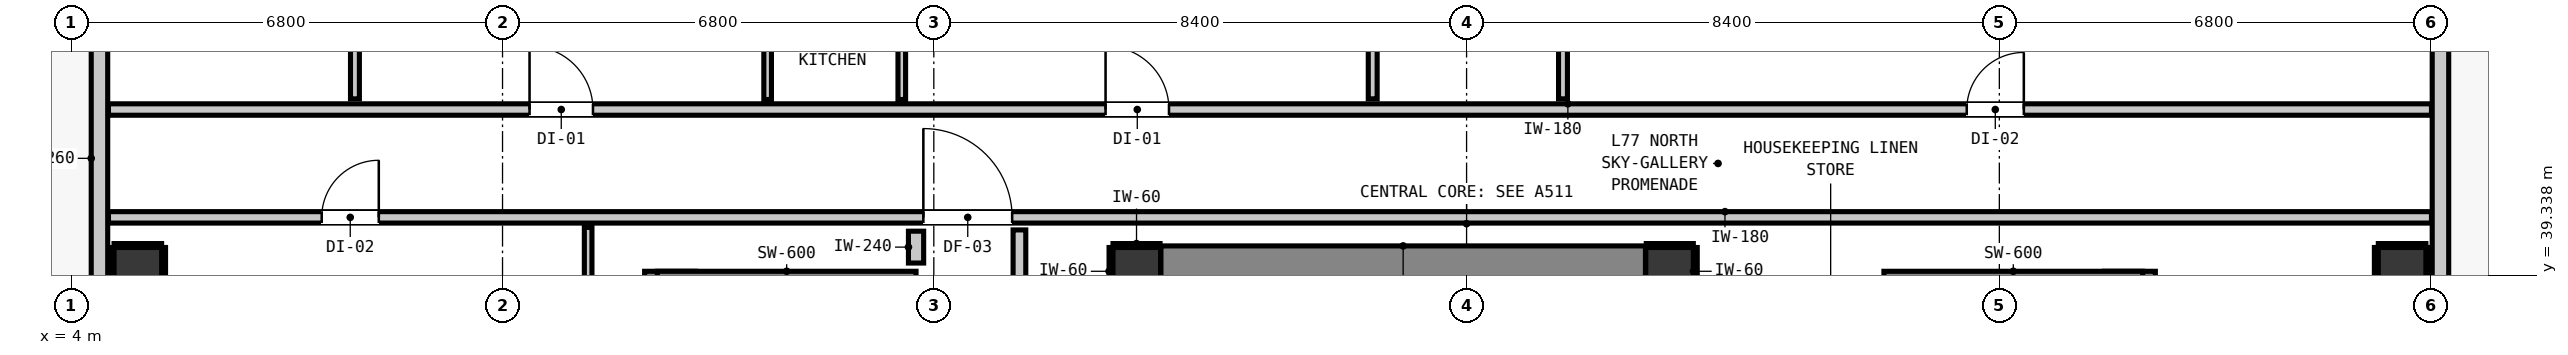
"""IFC4 building model, lengths in metres.
Left out: names, types, materials, properties, quantities, classifications, styles, units other than length and angle.
Written with IfcOpenShell. Run it as: python <this file> out.ifc"""

import sys

from ifc_helpers import new_model, si_unit, direction, frame, frame_2d, origin, origin_2d, place, context, subcontext, project, spatial, rectangle, extrude, element, fill, save


model = new_model("IFC4")
c1 = context("Model", 3, precision=1e-05, world=origin(), true_north=direction((0.0, 1.0)))
c2 = subcontext(c1, "Body", "Model", "MODEL_VIEW")
j1 = project(units=[si_unit("LENGTHUNIT", "METRE"), si_unit("PLANEANGLEUNIT", "RADIAN")], contexts=[c1])
p1 = place(None, origin())
s1 = spatial("IfcSite", under=j1, at=p1, CompositionType="ELEMENT")
p2 = place(p1, origin())
s2 = spatial("IfcBuilding", under=s1, at=p2, CompositionType="ELEMENT")
p3 = place(p2, frame((0.0, 0.0, 265.56)))
s3 = spatial("IfcBuildingStorey", under=s2, at=p3, CompositionType="ELEMENT", Elevation=265.56)
for number, where, z_axis, x_axis in (
    (1, (20.8, 39.4, 0.0), (0.0, 0.0, 1.0), (1.0, 0.0, 0.0)),
    (2, (29.2, 39.4, 0.0), (0.0, 0.0, 1.0), (1.0, 0.0, 0.0)),
):
    element("IfcColumn", number, at=place(p3, frame(where, z_axis=z_axis, x_axis=x_axis)), inside=s3, PredefinedType="COLUMN", context=c2, shape_type="SweptSolid", body=[
        extrude(rectangle(XDim=0.75, YDim=0.75, at=origin_2d()), origin(), (0.0, 0.0, 1.0), 3.32),
    ])
p4 = place(p3, frame((13.44, 31.08, 0.0), z_axis=(0.0, 0.0, 1.0), x_axis=(0.0, 1.0, 0.0)))
e3 = element("IfcWall", 3, at=p4, inside=s3, PredefinedType="SHEAR", context=c2, shape_type="SweptSolid", body=[
    extrude(rectangle(XDim=8.32, YDim=0.8, at=frame_2d((4.16, 0.0))), origin(), (0.0, 0.0, 1.0), 3.32),
])
p5 = place(p3, frame((13.24, 39.1, 0.0), z_axis=(0.0, 0.0, 1.0), x_axis=(1.0, 0.0, 0.0)))
e4 = element("IfcWall", 4, at=p5, inside=s3, PredefinedType="SHEAR", context=c2, shape_type="SweptSolid", body=[
    extrude(rectangle(XDim=4.08, YDim=0.6, at=frame_2d((2.04, 0.0))), origin(), (0.0, 0.0, 1.0), 3.32),
])
p6 = place(p3, frame((36.46, 31.08, 0.0), z_axis=(0.0, 0.0, 1.0), x_axis=(0.0, 1.0, 0.0)))
e5 = element("IfcWall", 5, at=p6, inside=s3, PredefinedType="SHEAR", context=c2, shape_type="SweptSolid", body=[
    extrude(rectangle(XDim=8.32, YDim=0.8, at=frame_2d((4.16, 0.0))), origin(), (0.0, 0.0, 1.0), 3.32),
])
p7 = place(p3, frame((32.58, 39.1, 0.0), z_axis=(0.0, 0.0, 1.0), x_axis=(1.0, 0.0, 0.0)))
e6 = element("IfcWall", 6, at=p7, inside=s3, PredefinedType="SHEAR", context=c2, shape_type="SweptSolid", body=[
    extrude(rectangle(XDim=4.08, YDim=0.6, at=frame_2d((2.04, 0.0))), origin(), (0.0, 0.0, 1.0), 3.32),
])
p8 = place(p3, frame((21.18, 39.4, 0.0), z_axis=(0.0, 0.0, 1.0), x_axis=(1.0, 0.0, 0.0)))
e7 = element("IfcWall", 7, at=p8, inside=s3, PredefinedType="SHEAR", context=c2, shape_type="SweptSolid", body=[
    extrude(rectangle(XDim=7.64, YDim=0.8, at=frame_2d((3.82, 0.0))), origin(), (0.0, 0.0, 1.0), 3.32),
])
for number, where, z_axis, x_axis in (
    (8, (5.05, 39.4, 0.0), (0.0, 0.0, 1.0), (1.0, 0.0, 0.0)),
    (9, (40.75, 39.4, 0.0), (0.0, 0.0, 1.0), (1.0, 0.0, 0.0)),
):
    element("IfcColumn", number, at=place(p3, frame(where, z_axis=z_axis, x_axis=x_axis)), inside=s3, PredefinedType="COLUMN", context=c2, shape_type="SweptSolid", body=[
        extrude(rectangle(XDim=0.75, YDim=0.75, at=origin_2d()), origin(), (0.0, 0.0, 1.0), 3.32),
    ])
p9 = place(p3, frame((4.445, 18.545, 0.0), z_axis=(0.0, 0.0, 1.0), x_axis=(0.0, 1.0, 0.0)))
e10 = element("IfcWall", 10, at=p9, inside=s3, PredefinedType="STANDARD", context=c2, shape_type="SweptSolid", body=[
    extrude(rectangle(XDim=30.31, YDim=0.26, at=frame_2d((15.155, 0.0))), origin(), (0.0, 0.0, 1.0), 3.1),
])
p10 = place(p9, frame((4.434, 0.0, 0.0)))
e11 = element("IfcOpeningElement", 11, at=p10, cuts=e10, PredefinedType="OPENING", context=c2, shape_type="SweptSolid", body=[
    extrude(rectangle(XDim=1.0, YDim=2.15, at=frame_2d((0.5, 1.075))), frame((0.0, 0.14, 0.0), z_axis=(0.0, -1.0, 0.0), x_axis=(1.0, 0.0, 0.0)), (0.0, 0.0, 1.0), 0.28),
])
p11 = place(p9, frame((28.241, 0.0, 0.85)))
e12 = element("IfcOpeningElement", 12, at=p11, cuts=e10, PredefinedType="OPENING", context=c2, shape_type="SweptSolid", body=[
    extrude(rectangle(XDim=1.05, YDim=1.65, at=frame_2d((0.525, 0.825))), frame((0.0, 0.14, 0.0), z_axis=(0.0, -1.0, 0.0), x_axis=(1.0, 0.0, 0.0)), (0.0, 0.0, 1.0), 0.28),
])
p12 = place(p9, frame((15.98, 0.0, 0.85)))
e13 = element("IfcOpeningElement", 13, at=p12, cuts=e10, PredefinedType="OPENING", context=c2, shape_type="SweptSolid", body=[
    extrude(rectangle(XDim=1.05, YDim=1.65, at=frame_2d((0.525, 0.825))), frame((0.0, 0.14, 0.0), z_axis=(0.0, -1.0, 0.0), x_axis=(1.0, 0.0, 0.0)), (0.0, 0.0, 1.0), 0.28),
])
p13 = place(p3, frame((41.355, 48.855, 0.0), z_axis=(0.0, 0.0, 1.0), x_axis=(0.0, -1.0, 0.0)))
e14 = element("IfcWall", 14, at=p13, inside=s3, PredefinedType="STANDARD", context=c2, shape_type="SweptSolid", body=[
    extrude(rectangle(XDim=30.31, YDim=0.26, at=frame_2d((15.155, 0.0))), origin(), (0.0, 0.0, 1.0), 3.1),
])
p14 = place(p13, frame((0.91, 0.0, 0.0)))
e15 = element("IfcOpeningElement", 15, at=p14, cuts=e14, PredefinedType="OPENING", context=c2, shape_type="SweptSolid", body=[
    extrude(rectangle(XDim=1.0, YDim=2.15, at=frame_2d((0.5, 1.075))), frame((0.0, 0.14, 0.0), z_axis=(0.0, -1.0, 0.0), x_axis=(1.0, 0.0, 0.0)), (0.0, 0.0, 1.0), 0.28),
])
p15 = place(p13, frame((3.932, 0.0, 0.85)))
e16 = element("IfcOpeningElement", 16, at=p15, cuts=e14, PredefinedType="OPENING", context=c2, shape_type="SweptSolid", body=[
    extrude(rectangle(XDim=1.05, YDim=1.65, at=frame_2d((0.525, 0.825))), frame((0.0, 0.14, 0.0), z_axis=(0.0, -1.0, 0.0), x_axis=(1.0, 0.0, 0.0)), (0.0, 0.0, 1.0), 0.28),
])
p16 = place(p3, frame((4.587, 40.25, 0.0), z_axis=(0.0, 0.0, 1.0), x_axis=(1.0, 0.0, 0.0)))
e17 = element("IfcWall", 17, at=p16, inside=s3, PredefinedType="PARTITIONING", context=c2, shape_type="SweptSolid", body=[
    extrude(rectangle(XDim=36.626, YDim=0.18, at=frame_2d((18.313, 0.0))), origin(), (0.0, 0.0, 1.0), 3.1),
])
p17 = place(p16, frame((12.848, 0.0, 0.0)))
e18 = element("IfcOpeningElement", 18, at=p17, cuts=e17, PredefinedType="OPENING", context=c2, shape_type="SweptSolid", body=[
    extrude(rectangle(XDim=1.4, YDim=2.15, at=frame_2d((0.7, 1.075))), frame((0.0, 0.1, 0.0), z_axis=(0.0, -1.0, 0.0), x_axis=(1.0, 0.0, 0.0)), (0.0, 0.0, 1.0), 0.2),
])
p18 = place(p16, frame((3.362, 0.0, 0.0)))
e19 = element("IfcOpeningElement", 19, at=p18, cuts=e17, PredefinedType="OPENING", context=c2, shape_type="SweptSolid", body=[
    extrude(rectangle(XDim=0.9, YDim=2.1, at=frame_2d((0.45, 1.05))), frame((0.0, 0.1, 0.0), z_axis=(0.0, -1.0, 0.0), x_axis=(1.0, 0.0, 0.0)), (0.0, 0.0, 1.0), 0.2),
])
p19 = place(p3, frame((4.587, 41.95, 0.0), z_axis=(0.0, 0.0, 1.0), x_axis=(1.0, 0.0, 0.0)))
e20 = element("IfcWall", 20, at=p19, inside=s3, PredefinedType="PARTITIONING", context=c2, shape_type="SweptSolid", body=[
    extrude(rectangle(XDim=36.626, YDim=0.18, at=frame_2d((18.313, 0.0))), origin(), (0.0, 0.0, 1.0), 3.1),
])
p20 = place(p19, frame((6.639, 0.0, 0.0)))
e21 = element("IfcOpeningElement", 21, at=p20, cuts=e20, PredefinedType="OPENING", context=c2, shape_type="SweptSolid", body=[
    extrude(rectangle(XDim=1.0, YDim=2.15, at=frame_2d((0.5, 1.075))), frame((0.0, 0.1, 0.0), z_axis=(0.0, -1.0, 0.0), x_axis=(1.0, 0.0, 0.0)), (0.0, 0.0, 1.0), 0.2),
])
p21 = place(p19, frame((15.721, 0.0, 0.0)))
e22 = element("IfcOpeningElement", 22, at=p21, cuts=e20, PredefinedType="OPENING", context=c2, shape_type="SweptSolid", body=[
    extrude(rectangle(XDim=1.0, YDim=2.15, at=frame_2d((0.5, 1.075))), frame((0.0, 0.1, 0.0), z_axis=(0.0, -1.0, 0.0), x_axis=(1.0, 0.0, 0.0)), (0.0, 0.0, 1.0), 0.2),
])
p22 = place(p19, frame((29.299, 0.0, 0.0)))
e23 = element("IfcOpeningElement", 23, at=p22, cuts=e20, PredefinedType="OPENING", context=c2, shape_type="SweptSolid", body=[
    extrude(rectangle(XDim=0.9, YDim=2.1, at=frame_2d((0.45, 1.05))), frame((0.0, 0.1, 0.0), z_axis=(0.0, -1.0, 0.0), x_axis=(1.0, 0.0, 0.0)), (0.0, 0.0, 1.0), 0.2),
])
p23 = place(p3, frame((17.32, 39.53, 0.0), z_axis=(0.0, 0.0, 1.0), x_axis=(0.0, 1.0, 0.0)))
e24 = element("IfcWall", 24, at=p23, inside=s3, PredefinedType="PARTITIONING", context=c2, shape_type="SweptSolid", body=[
    extrude(rectangle(XDim=0.502, YDim=0.24, at=frame_2d((0.251, 0.0))), origin(), (0.0, 0.0, 1.0), 3.1),
])
p24 = place(p3, frame((18.95, 38.918, 0.0), z_axis=(0.0, 0.0, 1.0), x_axis=(0.0, 1.0, 0.0)))
e25 = element("IfcWall", 25, at=p24, inside=s3, PredefinedType="PARTITIONING", context=c2, shape_type="SweptSolid", body=[
    extrude(rectangle(XDim=1.134, YDim=0.2, at=frame_2d((0.567, 0.0))), origin(), (0.0, 0.0, 1.0), 3.1),
])
p25 = place(p3, frame((8.473, 42.118, 0.0), z_axis=(0.0, 0.0, 1.0), x_axis=(0.0, 1.0, 0.0)))
e26 = element("IfcWall", 26, at=p25, inside=s3, PredefinedType="PARTITIONING", context=c2, shape_type="SweptSolid", body=[
    extrude(rectangle(XDim=3.49, YDim=0.14, at=frame_2d((1.745, 0.0))), origin(), (0.0, 0.0, 1.0), 3.1),
])
p26 = place(p25, frame((1.318, 0.0, 0.0)))
e27 = element("IfcOpeningElement", 27, at=p26, cuts=e26, PredefinedType="OPENING", context=c2, shape_type="SweptSolid", body=[
    extrude(rectangle(XDim=0.86, YDim=2.02, at=frame_2d((0.43, 1.01))), frame((0.0, 0.08, 0.0), z_axis=(0.0, -1.0, 0.0), x_axis=(1.0, 0.0, 0.0)), (0.0, 0.0, 1.0), 0.16),
])
p27 = place(p3, frame((24.52, 42.118, 0.0), z_axis=(0.0, 0.0, 1.0), x_axis=(0.0, 1.0, 0.0)))
e28 = element("IfcWall", 28, at=p27, inside=s3, PredefinedType="PARTITIONING", context=c2, shape_type="SweptSolid", body=[
    extrude(rectangle(XDim=3.49, YDim=0.14, at=frame_2d((1.745, 0.0))), origin(), (0.0, 0.0, 1.0), 3.1),
])
p28 = place(p27, frame((1.298, 0.0, 0.0)))
e29 = element("IfcOpeningElement", 29, at=p28, cuts=e28, PredefinedType="OPENING", context=c2, shape_type="SweptSolid", body=[
    extrude(rectangle(XDim=0.9, YDim=2.1, at=frame_2d((0.45, 1.05))), frame((0.0, 0.08, 0.0), z_axis=(0.0, -1.0, 0.0), x_axis=(1.0, 0.0, 0.0)), (0.0, 0.0, 1.0), 0.16),
])
p29 = place(p3, frame((27.52, 42.118, 0.0), z_axis=(0.0, 0.0, 1.0), x_axis=(0.0, 1.0, 0.0)))
e30 = element("IfcWall", 30, at=p29, inside=s3, PredefinedType="PARTITIONING", context=c2, shape_type="SweptSolid", body=[
    extrude(rectangle(XDim=3.49, YDim=0.14, at=frame_2d((1.745, 0.0))), origin(), (0.0, 0.0, 1.0), 3.1),
])
p30 = place(p3, frame((12.15, 29.938, 0.0), z_axis=(0.0, 0.0, 1.0), x_axis=(0.0, 1.0, 0.0)))
e31 = element("IfcWall", 31, at=p30, inside=s3, PredefinedType="PARTITIONING", context=c2, shape_type="SweptSolid", body=[
    extrude(rectangle(XDim=10.154, YDim=0.12, at=frame_2d((5.077, 0.0))), origin(), (0.0, 0.0, 1.0), 3.1),
])
p31 = place(p3, frame((14.98, 42.108, 0.0), z_axis=(0.0, 0.0, 1.0), x_axis=(0.0, 1.0, 0.0)))
e32 = element("IfcWall", 32, at=p31, inside=s3, PredefinedType="PARTITIONING", context=c2, shape_type="SweptSolid", body=[
    extrude(rectangle(XDim=8.705, YDim=0.12, at=frame_2d((4.353, 0.0))), origin(), (0.0, 0.0, 1.0), 3.1),
])
p32 = place(p31, frame((3.817, 0.0, 0.0)))
e33 = element("IfcOpeningElement", 33, at=p32, cuts=e32, PredefinedType="OPENING", context=c2, shape_type="SweptSolid", body=[
    extrude(rectangle(XDim=0.9, YDim=2.1, at=frame_2d((0.45, 1.05))), frame((0.0, 0.07, 0.0), z_axis=(0.0, -1.0, 0.0), x_axis=(1.0, 0.0, 0.0)), (0.0, 0.0, 1.0), 0.14),
])
p33 = place(p3, frame((17.095, 42.108, 0.0), z_axis=(0.0, 0.0, 1.0), x_axis=(0.0, 1.0, 0.0)))
e34 = element("IfcWall", 34, at=p33, inside=s3, PredefinedType="PARTITIONING", context=c2, shape_type="SweptSolid", body=[
    extrude(rectangle(XDim=8.705, YDim=0.12, at=frame_2d((4.353, 0.0))), origin(), (0.0, 0.0, 1.0), 3.1),
])
p34 = place(p3, frame((20.425, 39.807, 0.0), z_axis=(0.0, 0.0, 1.0), x_axis=(1.0, 0.0, 0.0)))
e35 = element("IfcWall", 35, at=p34, inside=s3, PredefinedType="PARTITIONING", context=c2, shape_type="SweptSolid", body=[
    extrude(rectangle(XDim=0.742, YDim=0.06, at=frame_2d((0.371, 0.0))), origin(), (0.0, 0.0, 1.0), 1.45),
])
p35 = place(p3, frame((20.393, 39.025, 0.0), z_axis=(0.0, 0.0, 1.0), x_axis=(0.0, 1.0, 0.0)))
e36 = element("IfcWall", 36, at=p35, inside=s3, PredefinedType="PARTITIONING", context=c2, shape_type="SweptSolid", body=[
    extrude(rectangle(XDim=0.75, YDim=0.06, at=frame_2d((0.375, 0.0))), origin(), (0.0, 0.0, 1.0), 1.45),
])
p36 = place(p3, frame((28.833, 39.807, 0.0), z_axis=(0.0, 0.0, 1.0), x_axis=(1.0, 0.0, 0.0)))
e37 = element("IfcWall", 37, at=p36, inside=s3, PredefinedType="PARTITIONING", context=c2, shape_type="SweptSolid", body=[
    extrude(rectangle(XDim=0.742, YDim=0.06, at=frame_2d((0.371, 0.0))), origin(), (0.0, 0.0, 1.0), 1.45),
])
for number, where, z_axis, x_axis in (
    (38, (29.607, 39.025, 0.0), (0.0, 0.0, 1.0), (0.0, 1.0, 0.0)),
    (39, (4.675, 39.807, 0.0), (0.0, 0.0, 1.0), (1.0, 0.0, 0.0)),
    (40, (4.643, 39.025, 0.0), (0.0, 0.0, 1.0), (0.0, 1.0, 0.0)),
    (41, (5.457, 39.025, 0.0), (0.0, 0.0, 1.0), (0.0, 1.0, 0.0)),
    (42, (40.375, 39.807, 0.0), (0.0, 0.0, 1.0), (1.0, 0.0, 0.0)),
    (43, (40.343, 39.025, 0.0), (0.0, 0.0, 1.0), (0.0, 1.0, 0.0)),
    (44, (41.157, 39.025, 0.0), (0.0, 0.0, 1.0), (0.0, 1.0, 0.0)),
):
    element("IfcWall", number, at=place(p3, frame(where, z_axis=z_axis, x_axis=x_axis)), inside=s3, PredefinedType="PARTITIONING", context=c2, shape_type="SweptSolid", body=[
        extrude(rectangle(XDim=0.75, YDim=0.06, at=frame_2d((0.375, 0.0))), origin(), (0.0, 0.0, 1.0), 1.45),
    ])
p37 = place(p17, origin())
e45 = element("IfcDoor", 45, at=p37, inside=s3, OperationType="SINGLE_SWING_LEFT", PredefinedType="DOOR", context=c2, shape_type="SweptSolid", body=[
    extrude(rectangle(XDim=1.4, YDim=2.15, at=frame_2d((0.7, 1.075))), frame((0.0, 0.025, 0.0), z_axis=(0.0, -1.0, 0.0), x_axis=(1.0, 0.0, 0.0)), (0.0, 0.0, 1.0), 0.05),
])
fill(e18, e45)
p38 = place(p20, origin())
e46 = element("IfcDoor", 46, at=p38, inside=s3, OperationType="SINGLE_SWING_LEFT", PredefinedType="DOOR", context=c2, shape_type="SweptSolid", body=[
    extrude(rectangle(XDim=1.0, YDim=2.15, at=frame_2d((0.5, 1.075))), frame((0.0, 0.025, 0.0), z_axis=(0.0, -1.0, 0.0), x_axis=(1.0, 0.0, 0.0)), (0.0, 0.0, 1.0), 0.05),
])
fill(e21, e46)
p39 = place(p21, origin())
e47 = element("IfcDoor", 47, at=p39, inside=s3, OperationType="SINGLE_SWING_LEFT", PredefinedType="DOOR", context=c2, shape_type="SweptSolid", body=[
    extrude(rectangle(XDim=1.0, YDim=2.15, at=frame_2d((0.5, 1.075))), frame((0.0, 0.025, 0.0), z_axis=(0.0, -1.0, 0.0), x_axis=(1.0, 0.0, 0.0)), (0.0, 0.0, 1.0), 0.05),
])
fill(e22, e47)
p40 = place(p22, origin())
e48 = element("IfcDoor", 48, at=p40, inside=s3, OperationType="SINGLE_SWING_RIGHT", PredefinedType="DOOR", context=c2, shape_type="SweptSolid", body=[
    extrude(rectangle(XDim=0.9, YDim=2.1, at=frame_2d((0.45, 1.05))), frame((0.0, 0.025, 0.0), z_axis=(0.0, -1.0, 0.0), x_axis=(1.0, 0.0, 0.0)), (0.0, 0.0, 1.0), 0.05),
])
fill(e23, e48)
p41 = place(p18, origin())
e49 = element("IfcDoor", 49, at=p41, inside=s3, OperationType="SINGLE_SWING_RIGHT", PredefinedType="DOOR", context=c2, shape_type="SweptSolid", body=[
    extrude(rectangle(XDim=0.9, YDim=2.1, at=frame_2d((0.45, 1.05))), frame((0.0, 0.025, 0.0), z_axis=(0.0, -1.0, 0.0), x_axis=(1.0, 0.0, 0.0)), (0.0, 0.0, 1.0), 0.05),
])
fill(e19, e49)
save(model, sys.argv[1])
